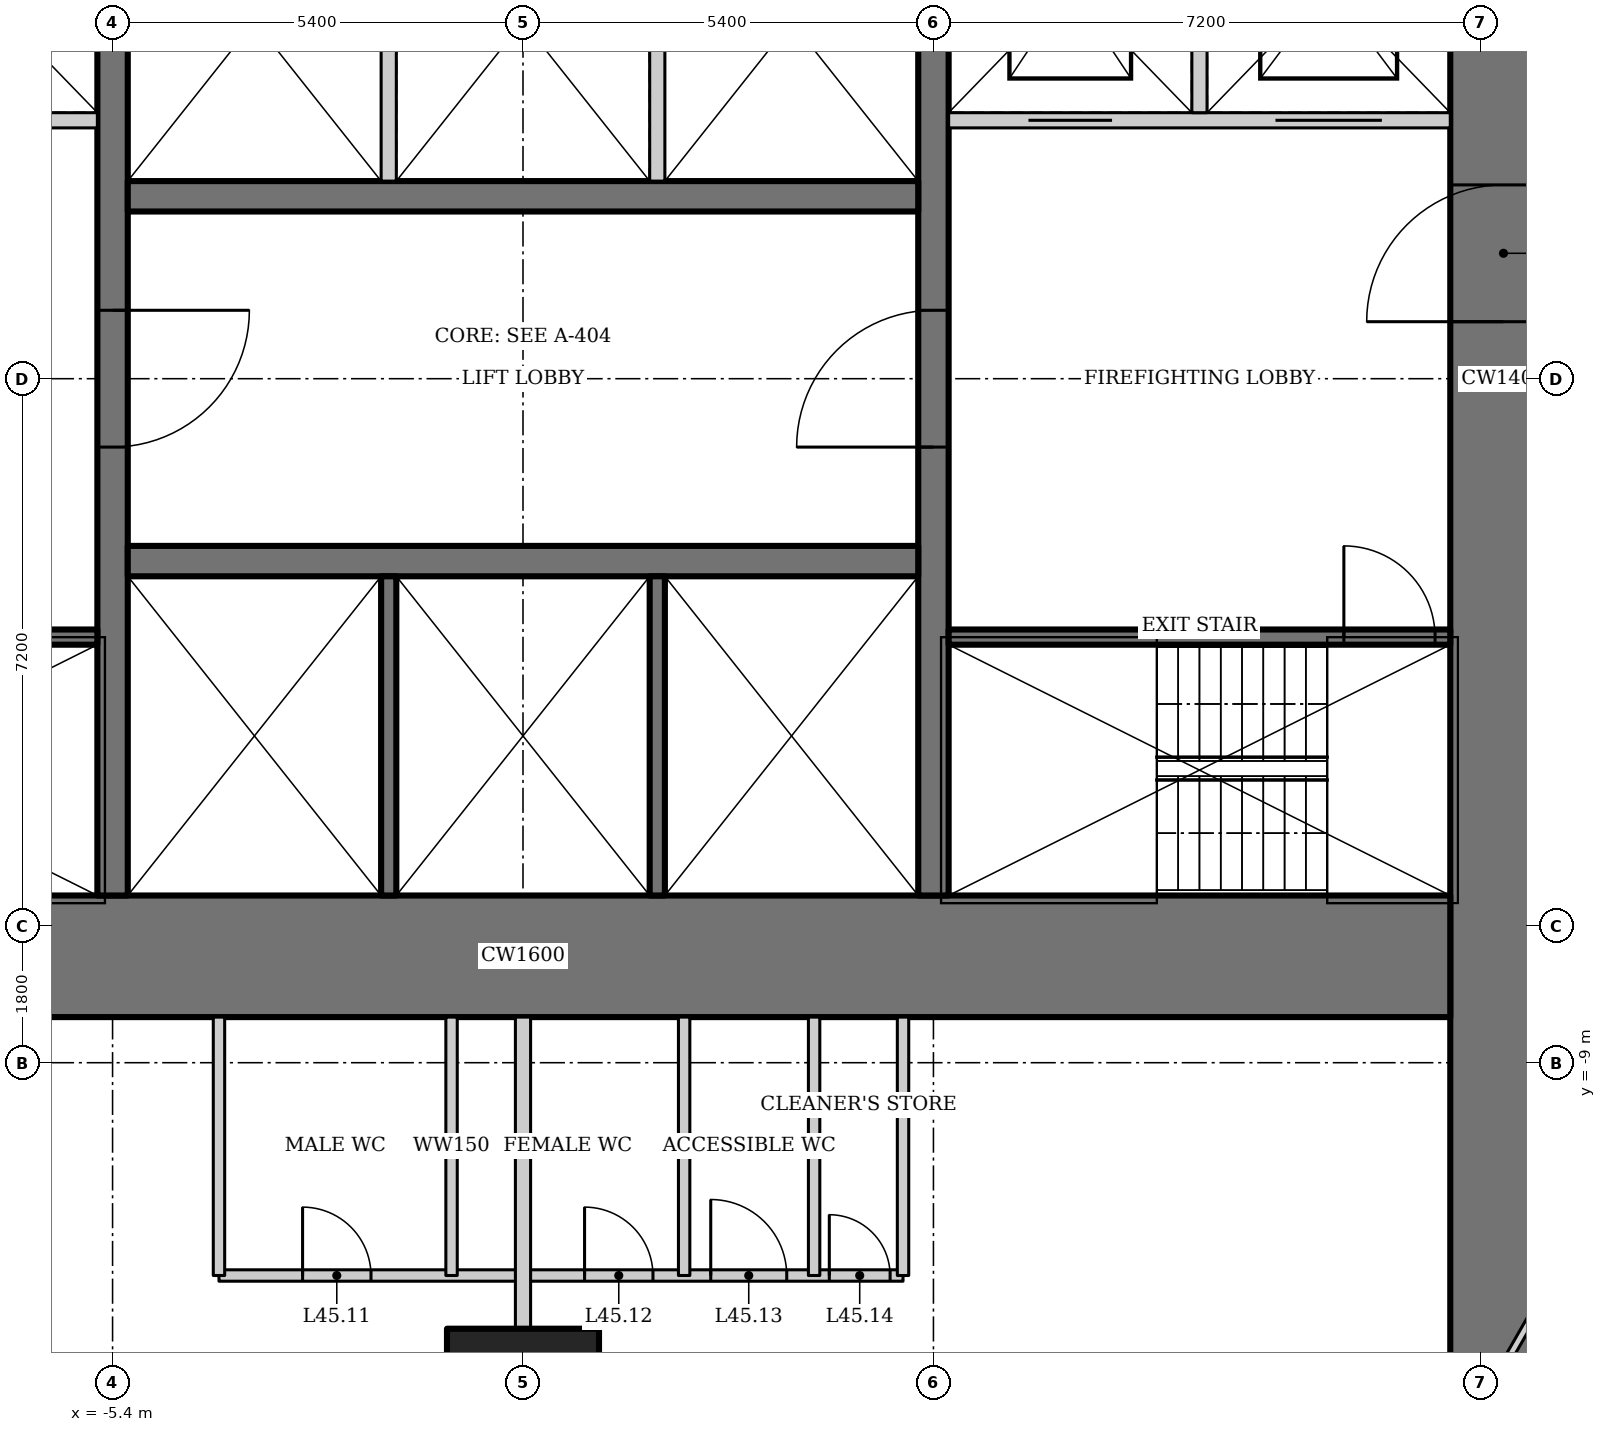
"""IFC4 building model, lengths in metres.
Left out: names, types, materials, properties, quantities, classifications, styles, units other than length and angle.
Written with IfcOpenShell. Run it as: python <this file> out.ifc"""

import sys

from ifc_helpers import new_model, si_unit, direction, frame, frame_2d, origin, origin_2d, place, context, subcontext, project, spatial, rectangle, hollow_rectangle, extrude, element, fill, save


model = new_model("IFC4")
c1 = context("Model", 3, precision=1e-05, world=origin(), true_north=direction((0.0, 1.0)))
c2 = subcontext(c1, "Body", "Model", "MODEL_VIEW")
j1 = project(units=[si_unit("LENGTHUNIT", "METRE"), si_unit("PLANEANGLEUNIT", "RADIAN")], contexts=[c1])
p1 = place(None, origin())
s1 = spatial("IfcSite", under=j1, at=p1, CompositionType="ELEMENT")
p2 = place(p1, origin())
s2 = spatial("IfcBuilding", under=s1, at=p2, CompositionType="ELEMENT")
p3 = place(p2, frame((0.0, 0.0, 193.0)))
s3 = spatial("IfcBuildingStorey", under=s2, at=p3, CompositionType="ELEMENT", Elevation=193.0)
p4 = place(p3, frame((0.0, -13.5, 0.0), z_axis=(0.0, 0.0, 1.0), x_axis=(1.0, 0.0, 0.0)))
e1 = element("IfcColumn", 1, at=p4, inside=s3, PredefinedType="COLUMN", context=c2, shape_type="SweptSolid", body=[
    extrude(hollow_rectangle(XDim=2.0, YDim=2.0, WallThickness=0.17, at=origin_2d()), origin(), (0.0, 0.0, 1.0), 6.0),
])
p5 = place(p3, frame((12.9, -13.0, 0.0), z_axis=(0.0, 0.0, 1.0), x_axis=(0.0, 1.0, 0.0)))
e2 = element("IfcWall", 2, at=p5, inside=s3, PredefinedType="SHEAR", context=c2, shape_type="SweptSolid", body=[
    extrude(rectangle(XDim=26.0, YDim=1.4, at=frame_2d((13.0, 0.0))), origin(), (0.0, 0.0, 1.0), 6.0),
])
p6 = place(p5, frame((13.75, 0.0, 0.0)))
e3 = element("IfcOpeningElement", 3, at=p6, cuts=e2, PredefinedType="OPENING", context=c2, shape_type="SweptSolid", body=[
    extrude(rectangle(XDim=1.8, YDim=2.1, at=frame_2d((0.9, 1.05))), frame((0.0, 0.71, 0.0), z_axis=(0.0, -1.0, 0.0), x_axis=(1.0, 0.0, 0.0)), (0.0, 0.0, 1.0), 1.42),
])
p7 = place(p3, frame((-12.2, -7.6, 0.0), z_axis=(0.0, 0.0, 1.0), x_axis=(1.0, 0.0, 0.0)))
e4 = element("IfcWall", 4, at=p7, inside=s3, PredefinedType="SHEAR", context=c2, shape_type="SweptSolid", body=[
    extrude(rectangle(XDim=24.4, YDim=1.6, at=frame_2d((12.2, 0.0))), origin(), (0.0, 0.0, 1.0), 6.0),
])
p8 = place(p3, frame((5.4, -6.8, 0.0), z_axis=(0.0, 0.0, 1.0), x_axis=(0.0, 1.0, 0.0)))
e5 = element("IfcWall", 5, at=p8, inside=s3, PredefinedType="SHEAR", context=c2, shape_type="SweptSolid", body=[
    extrude(rectangle(XDim=13.6, YDim=0.4, at=frame_2d((6.8, 0.0))), origin(), (0.0, 0.0, 1.0), 6.0),
])
p9 = place(p8, frame((5.9, 0.0, 0.0)))
e6 = element("IfcOpeningElement", 6, at=p9, cuts=e5, PredefinedType="OPENING", context=c2, shape_type="SweptSolid", body=[
    extrude(rectangle(XDim=1.8, YDim=2.1, at=frame_2d((0.9, 1.05))), frame((0.0, 0.21, 0.0), z_axis=(0.0, -1.0, 0.0), x_axis=(1.0, 0.0, 0.0)), (0.0, 0.0, 1.0), 0.42),
])
p10 = place(p3, frame((-5.4, 6.8, 0.0), z_axis=(0.0, 0.0, 1.0), x_axis=(0.0, -1.0, 0.0)))
e7 = element("IfcWall", 7, at=p10, inside=s3, PredefinedType="SHEAR", context=c2, shape_type="SweptSolid", body=[
    extrude(rectangle(XDim=13.6, YDim=0.4, at=frame_2d((6.8, 0.0))), origin(), (0.0, 0.0, 1.0), 6.0),
])
p11 = place(p10, frame((5.9, 0.0, 0.0)))
e8 = element("IfcOpeningElement", 8, at=p11, cuts=e7, PredefinedType="OPENING", context=c2, shape_type="SweptSolid", body=[
    extrude(rectangle(XDim=1.8, YDim=2.1, at=frame_2d((0.9, 1.05))), frame((0.0, 0.21, 0.0), z_axis=(0.0, -1.0, 0.0), x_axis=(1.0, 0.0, 0.0)), (0.0, 0.0, 1.0), 0.42),
])
p12 = place(p3, frame((-5.2, -2.4, 0.0), z_axis=(0.0, 0.0, 1.0), x_axis=(1.0, 0.0, 0.0)))
e9 = element("IfcWall", 9, at=p12, inside=s3, PredefinedType="SHEAR", context=c2, shape_type="SweptSolid", body=[
    extrude(rectangle(XDim=10.4, YDim=0.4, at=frame_2d((5.2, 0.0))), origin(), (0.0, 0.0, 1.0), 6.0),
])
for number, where, z_axis, x_axis in (
    (10, (-1.767, -2.6, 0.0), (0.0, 0.0, 1.0), (0.0, -1.0, 0.0)),
    (11, (1.767, -2.6, 0.0), (0.0, 0.0, 1.0), (0.0, -1.0, 0.0)),
):
    element("IfcWall", number, at=place(p3, frame(where, z_axis=z_axis, x_axis=x_axis)), inside=s3, PredefinedType="SOLIDWALL", context=c2, shape_type="SweptSolid", body=[
        extrude(rectangle(XDim=4.2, YDim=0.2, at=frame_2d((2.1, 0.0))), origin(), (0.0, 0.0, 1.0), 6.0),
    ])
p13 = place(p3, frame((5.2, 2.4, 0.0), z_axis=(0.0, 0.0, 1.0), x_axis=(-1.0, 0.0, 0.0)))
e12 = element("IfcWall", 12, at=p13, inside=s3, PredefinedType="SHEAR", context=c2, shape_type="SweptSolid", body=[
    extrude(rectangle(XDim=10.4, YDim=0.4, at=frame_2d((5.2, 0.0))), origin(), (0.0, 0.0, 1.0), 6.0),
])
for number, where, z_axis, x_axis in (
    (13, (-1.767, 2.6, 0.0), (0.0, 0.0, 1.0), (0.0, 1.0, 0.0)),
    (14, (1.767, 2.6, 0.0), (0.0, 0.0, 1.0), (0.0, 1.0, 0.0)),
):
    element("IfcWall", number, at=place(p3, frame(where, z_axis=z_axis, x_axis=x_axis)), inside=s3, PredefinedType="SOLIDWALL", context=c2, shape_type="SweptSolid", body=[
        extrude(rectangle(XDim=4.2, YDim=0.2, at=frame_2d((2.1, 0.0))), origin(), (0.0, 0.0, 1.0), 6.0),
    ])
p14 = place(p3, frame((5.6, -3.4, 0.0), z_axis=(0.0, 0.0, 1.0), x_axis=(1.0, 0.0, 0.0)))
e15 = element("IfcWall", 15, at=p14, inside=s3, PredefinedType="SHEAR", context=c2, shape_type="SweptSolid", body=[
    extrude(rectangle(XDim=6.6, YDim=0.2, at=frame_2d((3.3, 0.0))), origin(), (0.0, 0.0, 1.0), 6.0),
])
p15 = place(p14, frame((5.2, 0.0, 0.0)))
e16 = element("IfcOpeningElement", 16, at=p15, cuts=e15, PredefinedType="OPENING", context=c2, shape_type="SweptSolid", body=[
    extrude(rectangle(XDim=1.2, YDim=2.1, at=frame_2d((0.6, 1.05))), frame((0.0, 0.11, 0.0), z_axis=(0.0, -1.0, 0.0), x_axis=(1.0, 0.0, 0.0)), (0.0, 0.0, 1.0), 0.22),
])
p16 = place(p3, frame((12.2, 3.4, 0.0), z_axis=(0.0, 0.0, 1.0), x_axis=(-1.0, 0.0, 0.0)))
e17 = element("IfcWall", 17, at=p16, inside=s3, PredefinedType="SOLIDWALL", context=c2, shape_type="SweptSolid", body=[
    extrude(rectangle(XDim=6.6, YDim=0.2, at=frame_2d((3.3, 0.0))), origin(), (0.0, 0.0, 1.0), 6.0),
])
p17 = place(p16, frame((4.45, 0.0, 0.0)))
e18 = element("IfcOpeningElement", 18, at=p17, cuts=e17, PredefinedType="OPENING", context=c2, shape_type="SweptSolid", body=[
    extrude(rectangle(XDim=1.1, YDim=2.2, at=frame_2d((0.55, 1.1))), frame((0.0, 0.11, 0.0), z_axis=(0.0, -1.0, 0.0), x_axis=(1.0, 0.0, 0.0)), (0.0, 0.0, 1.0), 0.22),
])
p18 = place(p16, frame((0.9, 0.0, 0.0)))
e19 = element("IfcOpeningElement", 19, at=p18, cuts=e17, PredefinedType="OPENING", context=c2, shape_type="SweptSolid", body=[
    extrude(rectangle(XDim=1.4, YDim=2.2, at=frame_2d((0.7, 1.1))), frame((0.0, 0.11, 0.0), z_axis=(0.0, -1.0, 0.0), x_axis=(1.0, 0.0, 0.0)), (0.0, 0.0, 1.0), 0.22),
])
p19 = place(p3, frame((8.9, 3.5, 0.0), z_axis=(0.0, 0.0, 1.0), x_axis=(0.0, 1.0, 0.0)))
e20 = element("IfcWall", 20, at=p19, inside=s3, PredefinedType="SOLIDWALL", context=c2, shape_type="SweptSolid", body=[
    extrude(rectangle(XDim=3.3, YDim=0.2, at=frame_2d((1.65, 0.0))), origin(), (0.0, 0.0, 1.0), 6.0),
])
p20 = place(p3, frame((-5.6, -3.4, 0.0), z_axis=(0.0, 0.0, 1.0), x_axis=(-1.0, 0.0, 0.0)))
e21 = element("IfcWall", 21, at=p20, inside=s3, PredefinedType="SHEAR", context=c2, shape_type="SweptSolid", body=[
    extrude(rectangle(XDim=6.6, YDim=0.2, at=frame_2d((3.3, 0.0))), origin(), (0.0, 0.0, 1.0), 6.0),
])
p21 = place(p20, frame((5.2, 0.0, 0.0)))
e22 = element("IfcOpeningElement", 22, at=p21, cuts=e21, PredefinedType="OPENING", context=c2, shape_type="SweptSolid", body=[
    extrude(rectangle(XDim=1.2, YDim=2.1, at=frame_2d((0.6, 1.05))), frame((0.0, 0.11, 0.0), z_axis=(0.0, -1.0, 0.0), x_axis=(1.0, 0.0, 0.0)), (0.0, 0.0, 1.0), 0.22),
])
p22 = place(p3, frame((-12.2, 3.4, 0.0), z_axis=(0.0, 0.0, 1.0), x_axis=(1.0, 0.0, 0.0)))
e23 = element("IfcWall", 23, at=p22, inside=s3, PredefinedType="SOLIDWALL", context=c2, shape_type="SweptSolid", body=[
    extrude(rectangle(XDim=6.6, YDim=0.2, at=frame_2d((3.3, 0.0))), origin(), (0.0, 0.0, 1.0), 6.0),
])
p23 = place(p22, frame((1.05, 0.0, 0.0)))
e24 = element("IfcOpeningElement", 24, at=p23, cuts=e23, PredefinedType="OPENING", context=c2, shape_type="SweptSolid", body=[
    extrude(rectangle(XDim=1.1, YDim=2.2, at=frame_2d((0.55, 1.1))), frame((0.0, 0.11, 0.0), z_axis=(0.0, -1.0, 0.0), x_axis=(1.0, 0.0, 0.0)), (0.0, 0.0, 1.0), 0.22),
])
p24 = place(p22, frame((4.3, 0.0, 0.0)))
e25 = element("IfcOpeningElement", 25, at=p24, cuts=e23, PredefinedType="OPENING", context=c2, shape_type="SweptSolid", body=[
    extrude(rectangle(XDim=1.4, YDim=2.2, at=frame_2d((0.7, 1.1))), frame((0.0, 0.11, 0.0), z_axis=(0.0, -1.0, 0.0), x_axis=(1.0, 0.0, 0.0)), (0.0, 0.0, 1.0), 0.22),
])
p25 = place(p3, frame((-4.0, -11.8, 0.0), z_axis=(0.0, 0.0, 1.0), x_axis=(1.0, 0.0, 0.0)))
e26 = element("IfcWall", 26, at=p25, inside=s3, PredefinedType="SOLIDWALL", context=c2, shape_type="SweptSolid", body=[
    extrude(rectangle(XDim=9.0, YDim=0.15, at=frame_2d((4.5, 0.0))), origin(), (0.0, 0.0, 1.0), 5.85),
])
p26 = place(p25, frame((1.1, 0.0, 0.0)))
e27 = element("IfcOpeningElement", 27, at=p26, cuts=e26, PredefinedType="OPENING", context=c2, shape_type="SweptSolid", body=[
    extrude(rectangle(XDim=0.9, YDim=2.1, at=frame_2d((0.45, 1.05))), frame((0.0, 0.085, 0.0), z_axis=(0.0, -1.0, 0.0), x_axis=(1.0, 0.0, 0.0)), (0.0, 0.0, 1.0), 0.17),
])
p27 = place(p25, frame((4.81, 0.0, 0.0)))
e28 = element("IfcOpeningElement", 28, at=p27, cuts=e26, PredefinedType="OPENING", context=c2, shape_type="SweptSolid", body=[
    extrude(rectangle(XDim=0.9, YDim=2.1, at=frame_2d((0.45, 1.05))), frame((0.0, 0.085, 0.0), z_axis=(0.0, -1.0, 0.0), x_axis=(1.0, 0.0, 0.0)), (0.0, 0.0, 1.0), 0.17),
])
p28 = place(p25, frame((6.47, 0.0, 0.0)))
e29 = element("IfcOpeningElement", 29, at=p28, cuts=e26, PredefinedType="OPENING", context=c2, shape_type="SweptSolid", body=[
    extrude(rectangle(XDim=1.0, YDim=2.1, at=frame_2d((0.5, 1.05))), frame((0.0, 0.085, 0.0), z_axis=(0.0, -1.0, 0.0), x_axis=(1.0, 0.0, 0.0)), (0.0, 0.0, 1.0), 0.17),
])
p29 = place(p25, frame((8.03, 0.0, 0.0)))
e30 = element("IfcOpeningElement", 30, at=p29, cuts=e26, PredefinedType="OPENING", context=c2, shape_type="SweptSolid", body=[
    extrude(rectangle(XDim=0.8, YDim=2.1, at=frame_2d((0.4, 1.05))), frame((0.0, 0.085, 0.0), z_axis=(0.0, -1.0, 0.0), x_axis=(1.0, 0.0, 0.0)), (0.0, 0.0, 1.0), 0.17),
])
for number, where, z_axis, x_axis in (
    (31, (-4.0, -8.4, 0.0), (0.0, 0.0, 1.0), (0.0, -1.0, 0.0)),
    (32, (5.0, -8.4, 0.0), (0.0, 0.0, 1.0), (0.0, -1.0, 0.0)),
    (33, (-0.94, -8.4, 0.0), (0.0, 0.0, 1.0), (0.0, -1.0, 0.0)),
):
    element("IfcWall", number, at=place(p3, frame(where, z_axis=z_axis, x_axis=x_axis)), inside=s3, PredefinedType="SOLIDWALL", context=c2, shape_type="SweptSolid", body=[
        extrude(rectangle(XDim=3.4, YDim=0.15, at=frame_2d((1.7, 0.0))), origin(), (0.0, 0.0, 1.0), 5.85),
    ])
p30 = place(p3, frame((2.12, -8.4, 0.0), z_axis=(0.0, 0.0, 1.0), x_axis=(0.0, -1.0, 0.0)))
e34 = element("IfcWall", 34, at=p30, inside=s3, PredefinedType="SOLIDWALL", context=c2, shape_type="SweptSolid", body=[
    extrude(rectangle(XDim=3.4, YDim=0.15, at=frame_2d((1.7, 0.0))), origin(), (0.0, 0.0, 1.0), 5.093),
])
p31 = place(p3, frame((3.83, -8.4, 0.0), z_axis=(0.0, 0.0, 1.0), x_axis=(0.0, -1.0, 0.0)))
e35 = element("IfcWall", 35, at=p31, inside=s3, PredefinedType="SOLIDWALL", context=c2, shape_type="SweptSolid", body=[
    extrude(rectangle(XDim=3.4, YDim=0.15, at=frame_2d((1.7, 0.0))), origin(), (0.0, 0.0, 1.0), 5.85),
])
p32 = place(p3, frame((0.0, -8.4, 0.0), z_axis=(0.0, 0.0, 1.0), x_axis=(0.0, -1.0, 0.0)))
e36 = element("IfcWall", 36, at=p32, inside=s3, PredefinedType="SOLIDWALL", context=c2, shape_type="SweptSolid", body=[
    extrude(rectangle(XDim=13.045, YDim=0.2, at=frame_2d((6.522, 0.0))), origin(), (0.0, 0.0, 1.0), 4.65),
])
p33 = place(p3, frame((12.9, -13.0, 0.0), z_axis=(0.0, 0.0, 1.0), x_axis=(0.497886086714, 0.867242437071, 0.0)))
e37 = element("IfcWall", 37, at=p33, inside=s3, PredefinedType="PARTITIONING", context=c2, shape_type="SweptSolid", body=[
    extrude(rectangle(XDim=3.113, YDim=0.1, at=frame_2d((1.557, 0.0))), origin(), (0.0, 0.0, 1.0), 5.85),
])
p34 = place(p9, origin())
e38 = element("IfcDoor", 38, at=p34, inside=s3, OperationType="DOUBLE_DOOR_DOUBLE_SWING", PredefinedType="DOOR", context=c2, shape_type="SweptSolid", body=[
    extrude(rectangle(XDim=1.8, YDim=2.1, at=frame_2d((0.9, 1.05))), frame((0.0, 0.025, 0.0), z_axis=(0.0, -1.0, 0.0), x_axis=(1.0, 0.0, 0.0)), (0.0, 0.0, 1.0), 0.05),
])
fill(e6, e38)
p35 = place(p11, origin())
e39 = element("IfcDoor", 39, at=p35, inside=s3, OperationType="DOUBLE_DOOR_DOUBLE_SWING", PredefinedType="DOOR", context=c2, shape_type="SweptSolid", body=[
    extrude(rectangle(XDim=1.8, YDim=2.1, at=frame_2d((0.9, 1.05))), frame((0.0, 0.025, 0.0), z_axis=(0.0, -1.0, 0.0), x_axis=(1.0, 0.0, 0.0)), (0.0, 0.0, 1.0), 0.05),
])
fill(e8, e39)
p36 = place(p15, origin())
e40 = element("IfcDoor", 40, at=p36, inside=s3, OperationType="SINGLE_SWING_RIGHT", PredefinedType="DOOR", context=c2, shape_type="SweptSolid", body=[
    extrude(rectangle(XDim=1.2, YDim=2.1, at=frame_2d((0.6, 1.05))), frame((0.0, 0.025, 0.0), z_axis=(0.0, -1.0, 0.0), x_axis=(1.0, 0.0, 0.0)), (0.0, 0.0, 1.0), 0.05),
])
fill(e16, e40)
p37 = place(p6, origin())
e41 = element("IfcDoor", 41, at=p37, inside=s3, OperationType="DOUBLE_DOOR_DOUBLE_SWING", PredefinedType="DOOR", context=c2, shape_type="SweptSolid", body=[
    extrude(rectangle(XDim=1.8, YDim=2.1, at=frame_2d((0.9, 1.05))), frame((0.0, 0.025, 0.0), z_axis=(0.0, -1.0, 0.0), x_axis=(1.0, 0.0, 0.0)), (0.0, 0.0, 1.0), 0.05),
])
fill(e3, e41)
p38 = place(p17, origin())
e42 = element("IfcDoor", 42, at=p38, inside=s3, OperationType="DOUBLE_DOOR_SLIDING", PredefinedType="DOOR", context=c2, shape_type="SweptSolid", body=[
    extrude(rectangle(XDim=1.1, YDim=2.2, at=frame_2d((0.55, 1.1))), frame((0.0, 0.025, 0.0), z_axis=(0.0, -1.0, 0.0), x_axis=(1.0, 0.0, 0.0)), (0.0, 0.0, 1.0), 0.05),
])
fill(e18, e42)
p39 = place(p18, origin())
e43 = element("IfcDoor", 43, at=p39, inside=s3, OperationType="DOUBLE_DOOR_SLIDING", PredefinedType="DOOR", context=c2, shape_type="SweptSolid", body=[
    extrude(rectangle(XDim=1.4, YDim=2.2, at=frame_2d((0.7, 1.1))), frame((0.0, 0.025, 0.0), z_axis=(0.0, -1.0, 0.0), x_axis=(1.0, 0.0, 0.0)), (0.0, 0.0, 1.0), 0.05),
])
fill(e19, e43)
p40 = place(p26, origin())
e44 = element("IfcDoor", 44, at=p40, inside=s3, OperationType="SINGLE_SWING_LEFT", PredefinedType="DOOR", context=c2, shape_type="SweptSolid", body=[
    extrude(rectangle(XDim=0.9, YDim=2.1, at=frame_2d((0.45, 1.05))), frame((0.0, 0.025, 0.0), z_axis=(0.0, -1.0, 0.0), x_axis=(1.0, 0.0, 0.0)), (0.0, 0.0, 1.0), 0.05),
])
fill(e27, e44)
p41 = place(p27, origin())
e45 = element("IfcDoor", 45, at=p41, inside=s3, OperationType="SINGLE_SWING_LEFT", PredefinedType="DOOR", context=c2, shape_type="SweptSolid", body=[
    extrude(rectangle(XDim=0.9, YDim=2.1, at=frame_2d((0.45, 1.05))), frame((0.0, 0.025, 0.0), z_axis=(0.0, -1.0, 0.0), x_axis=(1.0, 0.0, 0.0)), (0.0, 0.0, 1.0), 0.05),
])
fill(e28, e45)
p42 = place(p28, origin())
e46 = element("IfcDoor", 46, at=p42, inside=s3, OperationType="SINGLE_SWING_LEFT", PredefinedType="DOOR", context=c2, shape_type="SweptSolid", body=[
    extrude(rectangle(XDim=1.0, YDim=2.1, at=frame_2d((0.5, 1.05))), frame((0.0, 0.025, 0.0), z_axis=(0.0, -1.0, 0.0), x_axis=(1.0, 0.0, 0.0)), (0.0, 0.0, 1.0), 0.05),
])
fill(e29, e46)
p43 = place(p29, origin())
e47 = element("IfcDoor", 47, at=p43, inside=s3, OperationType="SINGLE_SWING_LEFT", PredefinedType="DOOR", context=c2, shape_type="SweptSolid", body=[
    extrude(rectangle(XDim=0.8, YDim=2.1, at=frame_2d((0.4, 1.05))), frame((0.0, 0.025, 0.0), z_axis=(0.0, -1.0, 0.0), x_axis=(1.0, 0.0, 0.0)), (0.0, 0.0, 1.0), 0.05),
])
fill(e30, e47)
save(model, sys.argv[1])
